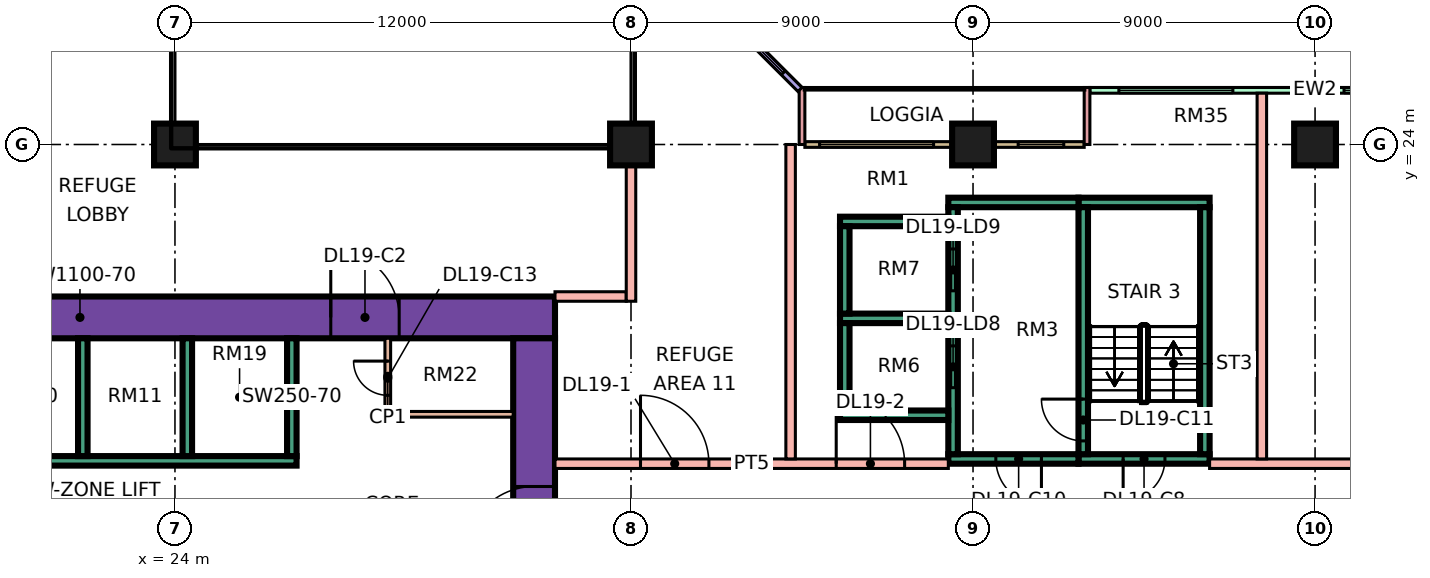
"""IFC4 building model, lengths in metres.
Left out: names, types, materials, properties, quantities, classifications, styles, units other than length and angle.
Written with IfcOpenShell. Run it as: python <this file> out.ifc"""

import sys

from ifc_helpers import new_model, si_unit, direction, frame, frame_2d, origin, origin_2d, place, context, subcontext, project, spatial, rectangle, extrude, element, fill, save


model = new_model("IFC4")
c1 = context("Model", 3, precision=1e-05, world=origin(), true_north=direction((0.0, 1.0)))
c2 = subcontext(c1, "Body", "Model", "MODEL_VIEW")
j1 = project(units=[si_unit("LENGTHUNIT", "METRE"), si_unit("PLANEANGLEUNIT", "RADIAN")], contexts=[c1])
p1 = place(None, origin())
s1 = spatial("IfcSite", under=j1, at=p1, CompositionType="ELEMENT")
p2 = place(p1, origin())
s2 = spatial("IfcBuilding", under=s1, at=p2, CompositionType="ELEMENT")
p3 = place(p2, frame((0.0, 0.0, 86.4)))
s3 = spatial("IfcBuildingStorey", under=s2, at=p3, CompositionType="ELEMENT", Elevation=86.4)
for number, where, z_axis, x_axis in (
    (1, (24.0, 24.0, 0.0), (0.0, 0.0, 1.0), (1.0, 0.0, 0.0)),
    (2, (36.0, 24.0, 0.0), (0.0, 0.0, 1.0), (1.0, 0.0, 0.0)),
    (3, (45.0, 24.0, 0.0), (0.0, 0.0, 1.0), (1.0, 0.0, 0.0)),
    (4, (54.0, 24.0, 0.0), (0.0, 0.0, 1.0), (1.0, 0.0, 0.0)),
):
    element("IfcColumn", number, at=place(p3, frame(where, z_axis=z_axis, x_axis=x_axis)), inside=s3, PredefinedType="COLUMN", context=c2, shape_type="SweptSolid", body=[
        extrude(rectangle(XDim=1.1, YDim=1.1, at=origin_2d()), origin(), (0.0, 0.0, 1.0), 5.5),
    ])
p4 = place(p3, frame((9.0, 19.45, 0.0), z_axis=(0.0, 0.0, 1.0), x_axis=(1.0, 0.0, 0.0)))
e5 = element("IfcWall", 5, at=p4, inside=s3, PredefinedType="SHEAR", context=c2, shape_type="SweptSolid", body=[
    extrude(rectangle(XDim=25.0, YDim=1.1, at=frame_2d((12.5, 0.0))), origin(), (0.0, 0.0, 1.0), 5.5),
])
p5 = place(p4, frame((19.1, 0.0, 0.0)))
e6 = element("IfcOpeningElement", 6, at=p5, cuts=e5, PredefinedType="OPENING", context=c2, shape_type="SweptSolid", body=[
    extrude(rectangle(XDim=1.8, YDim=2.4, at=frame_2d((0.9, 1.2))), frame((0.0, 0.56, 0.0), z_axis=(0.0, -1.0, 0.0), x_axis=(1.0, 0.0, 0.0)), (0.0, 0.0, 1.0), 1.12),
])
p6 = place(p3, frame((33.45, 8.1, 0.0), z_axis=(0.0, 0.0, 1.0), x_axis=(0.0, 1.0, 0.0)))
e7 = element("IfcWall", 7, at=p6, inside=s3, PredefinedType="SHEAR", context=c2, shape_type="SweptSolid", body=[
    extrude(rectangle(XDim=10.8, YDim=1.1, at=frame_2d((5.4, 0.0))), origin(), (0.0, 0.0, 1.0), 5.5),
])
p7 = place(p6, frame((5.1, 0.0, 0.0)))
e8 = element("IfcOpeningElement", 8, at=p7, cuts=e7, PredefinedType="OPENING", context=c2, shape_type="SweptSolid", body=[
    extrude(rectangle(XDim=1.8, YDim=2.4, at=frame_2d((0.9, 1.2))), frame((0.0, 0.56, 0.0), z_axis=(0.0, -1.0, 0.0), x_axis=(1.0, 0.0, 0.0)), (0.0, 0.0, 1.0), 1.12),
])
p8 = place(p3, frame((13.45, 15.675, 0.0), z_axis=(0.0, 0.0, 1.0), x_axis=(1.0, 0.0, 0.0)))
e9 = element("IfcWall", 9, at=p8, inside=s3, PredefinedType="SHEAR", context=c2, shape_type="SweptSolid", body=[
    extrude(rectangle(XDim=13.75, YDim=0.25, at=frame_2d((6.875, 0.0))), origin(), (0.0, 0.0, 1.0), 5.5),
])
for number, where, z_axis, x_axis in (
    (10, (21.575, 15.8, 0.0), (0.0, 0.0, 1.0), (0.0, 1.0, 0.0)),
    (11, (24.325, 15.8, 0.0), (0.0, 0.0, 1.0), (0.0, 1.0, 0.0)),
    (12, (27.075, 15.8, 0.0), (0.0, 0.0, 1.0), (0.0, 1.0, 0.0)),
):
    element("IfcWall", number, at=place(p3, frame(where, z_axis=z_axis, x_axis=x_axis)), inside=s3, PredefinedType="SHEAR", context=c2, shape_type="SweptSolid", body=[
        extrude(rectangle(XDim=3.1, YDim=0.25, at=frame_2d((1.55, 0.0))), origin(), (0.0, 0.0, 1.0), 5.5),
    ])
p9 = place(p3, frame((47.775, 15.725, 0.0), z_axis=(0.0, 0.0, 1.0), x_axis=(1.0, 0.0, 0.0)))
e13 = element("IfcWall", 13, at=p9, inside=s3, PredefinedType="SHEAR", context=c2, shape_type="SweptSolid", body=[
    extrude(rectangle(XDim=3.45, YDim=0.25, at=frame_2d((1.725, 0.0))), origin(), (0.0, 0.0, 1.0), 5.5),
])
p10 = place(p9, frame((1.175, 0.0, 0.0)))
e14 = element("IfcOpeningElement", 14, at=p10, cuts=e13, PredefinedType="OPENING", context=c2, shape_type="SweptSolid", body=[
    extrude(rectangle(XDim=1.1, YDim=2.2, at=frame_2d((0.55, 1.1))), frame((0.0, 0.135, 0.0), z_axis=(0.0, -1.0, 0.0), x_axis=(1.0, 0.0, 0.0)), (0.0, 0.0, 1.0), 0.27),
])
p11 = place(p3, frame((47.775, 22.475, 0.0), z_axis=(0.0, 0.0, 1.0), x_axis=(1.0, 0.0, 0.0)))
e15 = element("IfcWall", 15, at=p11, inside=s3, PredefinedType="SHEAR", context=c2, shape_type="SweptSolid", body=[
    extrude(rectangle(XDim=3.45, YDim=0.25, at=frame_2d((1.725, 0.0))), origin(), (0.0, 0.0, 1.0), 5.5),
])
p12 = place(p3, frame((47.9, 15.85, 0.0), z_axis=(0.0, 0.0, 1.0), x_axis=(0.0, 1.0, 0.0)))
e16 = element("IfcWall", 16, at=p12, inside=s3, PredefinedType="SHEAR", context=c2, shape_type="SweptSolid", body=[
    extrude(rectangle(XDim=6.5, YDim=0.25, at=frame_2d((3.25, 0.0))), origin(), (0.0, 0.0, 1.0), 5.5),
])
p13 = place(p12, frame((0.35, 0.0, 0.0)))
e17 = element("IfcOpeningElement", 17, at=p13, cuts=e16, PredefinedType="OPENING", context=c2, shape_type="SweptSolid", body=[
    extrude(rectangle(XDim=1.1, YDim=2.2, at=frame_2d((0.55, 1.1))), frame((0.0, 0.135, 0.0), z_axis=(0.0, -1.0, 0.0), x_axis=(1.0, 0.0, 0.0)), (0.0, 0.0, 1.0), 0.27),
])
p14 = place(p3, frame((51.1, 15.85, 0.0), z_axis=(0.0, 0.0, 1.0), x_axis=(0.0, 1.0, 0.0)))
e18 = element("IfcWall", 18, at=p14, inside=s3, PredefinedType="SHEAR", context=c2, shape_type="SweptSolid", body=[
    extrude(rectangle(XDim=6.5, YDim=0.25, at=frame_2d((3.25, 0.0))), origin(), (0.0, 0.0, 1.0), 5.5),
])
p15 = place(p3, frame((44.35, 15.725, 0.0), z_axis=(0.0, 0.0, 1.0), x_axis=(1.0, 0.0, 0.0)))
e19 = element("IfcWall", 19, at=p15, inside=s3, PredefinedType="SHEAR", context=c2, shape_type="SweptSolid", body=[
    extrude(rectangle(XDim=3.425, YDim=0.25, at=frame_2d((1.712, 0.0))), origin(), (0.0, 0.0, 1.0), 5.5),
])
p16 = place(p15, frame((1.25, 0.0, 0.0)))
e20 = element("IfcOpeningElement", 20, at=p16, cuts=e19, PredefinedType="OPENING", context=c2, shape_type="SweptSolid", body=[
    extrude(rectangle(XDim=1.2, YDim=2.2, at=frame_2d((0.6, 1.1))), frame((0.0, 0.135, 0.0), z_axis=(0.0, -1.0, 0.0), x_axis=(1.0, 0.0, 0.0)), (0.0, 0.0, 1.0), 0.27),
])
p17 = place(p3, frame((44.35, 22.475, 0.0), z_axis=(0.0, 0.0, 1.0), x_axis=(1.0, 0.0, 0.0)))
e21 = element("IfcWall", 21, at=p17, inside=s3, PredefinedType="SHEAR", context=c2, shape_type="SweptSolid", body=[
    extrude(rectangle(XDim=3.425, YDim=0.25, at=frame_2d((1.712, 0.0))), origin(), (0.0, 0.0, 1.0), 5.5),
])
p18 = place(p3, frame((44.475, 15.85, 0.0), z_axis=(0.0, 0.0, 1.0), x_axis=(0.0, 1.0, 0.0)))
e22 = element("IfcWall", 22, at=p18, inside=s3, PredefinedType="SHEAR", context=c2, shape_type="SweptSolid", body=[
    extrude(rectangle(XDim=6.5, YDim=0.25, at=frame_2d((3.25, 0.0))), origin(), (0.0, 0.0, 1.0), 5.5),
])
p19 = place(p18, frame((1.75, 0.0, 0.0)))
e23 = element("IfcOpeningElement", 23, at=p19, cuts=e22, PredefinedType="OPENING", context=c2, shape_type="SweptSolid", body=[
    extrude(rectangle(XDim=1.1, YDim=2.2, at=frame_2d((0.55, 1.1))), frame((0.0, 0.135, 0.0), z_axis=(0.0, -1.0, 0.0), x_axis=(1.0, 0.0, 0.0)), (0.0, 0.0, 1.0), 0.27),
])
p20 = place(p18, frame((4.3, 0.0, 0.0)))
e24 = element("IfcOpeningElement", 24, at=p20, cuts=e22, PredefinedType="OPENING", context=c2, shape_type="SweptSolid", body=[
    extrude(rectangle(XDim=1.1, YDim=2.2, at=frame_2d((0.55, 1.1))), frame((0.0, 0.135, 0.0), z_axis=(0.0, -1.0, 0.0), x_axis=(1.0, 0.0, 0.0)), (0.0, 0.0, 1.0), 0.27),
])
for number, where, z_axis, x_axis in (
    (25, (41.5, 16.875, 0.0), (0.0, 0.0, 1.0), (1.0, 0.0, 0.0)),
    (26, (41.5, 19.425, 0.0), (0.0, 0.0, 1.0), (1.0, 0.0, 0.0)),
    (27, (41.5, 21.975, 0.0), (0.0, 0.0, 1.0), (1.0, 0.0, 0.0)),
):
    element("IfcWall", number, at=place(p3, frame(where, z_axis=z_axis, x_axis=x_axis)), inside=s3, PredefinedType="SHEAR", context=c2, shape_type="SweptSolid", body=[
        extrude(rectangle(XDim=2.85, YDim=0.25, at=frame_2d((1.425, 0.0))), origin(), (0.0, 0.0, 1.0), 5.5),
    ])
for number, where, z_axis, x_axis in (
    (28, (41.625, 17.0, 0.0), (0.0, 0.0, 1.0), (0.0, 1.0, 0.0)),
    (29, (41.625, 19.55, 0.0), (0.0, 0.0, 1.0), (0.0, 1.0, 0.0)),
):
    element("IfcWall", number, at=place(p3, frame(where, z_axis=z_axis, x_axis=x_axis)), inside=s3, PredefinedType="SHEAR", context=c2, shape_type="SweptSolid", body=[
        extrude(rectangle(XDim=2.3, YDim=0.25, at=frame_2d((1.15, 0.0))), origin(), (0.0, 0.0, 1.0), 5.5),
    ])
p21 = place(p3, frame((59.925, 25.425, 0.0), z_axis=(0.0, 0.0, 1.0), x_axis=(-1.0, 0.0, 0.0)))
e30 = element("IfcWall", 30, at=p21, inside=s3, PredefinedType="SOLIDWALL", context=c2, shape_type="SweptSolid", body=[
    extrude(rectangle(XDim=11.85, YDim=0.15, at=frame_2d((5.925, 0.0))), origin(), (0.0, 0.0, 1.0), 5.1),
])
p22 = place(p21, frame((2.163, 0.0, 0.45)))
e31 = element("IfcOpeningElement", 31, at=p22, cuts=e30, PredefinedType="OPENING", context=c2, shape_type="SweptSolid", body=[
    extrude(rectangle(XDim=3.0, YDim=3.6, at=frame_2d((1.5, 1.8))), frame((0.0, 0.085, 0.0), z_axis=(0.0, -1.0, 0.0), x_axis=(1.0, 0.0, 0.0)), (0.0, 0.0, 1.0), 0.17),
])
p23 = place(p21, frame((8.087, 0.0, 0.45)))
e32 = element("IfcOpeningElement", 32, at=p23, cuts=e30, PredefinedType="OPENING", context=c2, shape_type="SweptSolid", body=[
    extrude(rectangle(XDim=3.0, YDim=3.6, at=frame_2d((1.5, 1.8))), frame((0.0, 0.085, 0.0), z_axis=(0.0, -1.0, 0.0), x_axis=(1.0, 0.0, 0.0)), (0.0, 0.0, 1.0), 0.17),
])
p24 = place(p3, frame((47.925, 24.0, 0.0), z_axis=(0.0, 0.0, 1.0), x_axis=(-1.0, 0.0, 0.0)))
e33 = element("IfcWall", 33, at=p24, inside=s3, PredefinedType="SOLIDWALL", context=c2, shape_type="SweptSolid", body=[
    extrude(rectangle(XDim=7.35, YDim=0.15, at=frame_2d((3.675, 0.0))), origin(), (0.0, 0.0, 1.0), 5.1),
])
p25 = place(p24, frame((0.538, 0.0, 0.45)))
e34 = element("IfcOpeningElement", 34, at=p25, cuts=e33, PredefinedType="OPENING", context=c2, shape_type="SweptSolid", body=[
    extrude(rectangle(XDim=1.2, YDim=3.6, at=frame_2d((0.6, 1.8))), frame((0.0, 0.085, 0.0), z_axis=(0.0, -1.0, 0.0), x_axis=(1.0, 0.0, 0.0)), (0.0, 0.0, 1.0), 0.17),
])
p26 = place(p24, frame((3.962, 0.0, 0.45)))
e35 = element("IfcOpeningElement", 35, at=p26, cuts=e33, PredefinedType="OPENING", context=c2, shape_type="SweptSolid", body=[
    extrude(rectangle(XDim=3.0, YDim=3.6, at=frame_2d((1.5, 1.8))), frame((0.0, 0.085, 0.0), z_axis=(0.0, -1.0, 0.0), x_axis=(1.0, 0.0, 0.0)), (0.0, 0.0, 1.0), 0.17),
])
for number, where, z_axis, x_axis in (
    (36, (48.0, 25.5, 0.0), (0.0, 0.0, 1.0), (0.0, -1.0, 0.0)),
    (37, (40.5, 25.5, 0.0), (0.0, 0.0, 1.0), (0.0, -1.0, 0.0)),
):
    element("IfcWall", number, at=place(p3, frame(where, z_axis=z_axis, x_axis=x_axis)), inside=s3, PredefinedType="SOLIDWALL", context=c2, shape_type="SweptSolid", body=[
        extrude(rectangle(XDim=1.5, YDim=0.15, at=frame_2d((0.75, 0.0))), origin(), (0.0, 0.0, 1.0), 5.1),
    ])
p27 = place(p3, frame((40.447, 25.447, 0.0), z_axis=(0.0, 0.0, 1.0), x_axis=(-0.707106781187, 0.707106781187, 0.0)))
e38 = element("IfcWall", 38, at=p27, inside=s3, PredefinedType="SOLIDWALL", context=c2, shape_type="SweptSolid", body=[
    extrude(rectangle(XDim=4.243, YDim=0.15, at=frame_2d((2.121, 0.0))), origin(), (0.0, 0.0, 1.0), 5.1),
])
p28 = place(p27, frame((0.621, 0.0, 0.45)))
e39 = element("IfcOpeningElement", 39, at=p28, cuts=e38, PredefinedType="OPENING", context=c2, shape_type="SweptSolid", body=[
    extrude(rectangle(XDim=3.0, YDim=3.6, at=frame_2d((1.5, 1.8))), frame((0.0, 0.085, 0.0), z_axis=(0.0, -1.0, 0.0), x_axis=(1.0, 0.0, 0.0)), (0.0, 0.0, 1.0), 0.17),
])
p29 = place(p3, frame((29.6, 16.9, 0.0), z_axis=(0.0, 0.0, 1.0), x_axis=(0.0, 1.0, 0.0)))
e40 = element("IfcWall", 40, at=p29, inside=s3, PredefinedType="PARTITIONING", context=c2, shape_type="SweptSolid", body=[
    extrude(rectangle(XDim=2.0, YDim=0.15, at=frame_2d((1.0, 0.0))), origin(), (0.0, 0.0, 1.0), 5.1),
])
p30 = place(p29, frame((0.5, 0.0, 0.0)))
e41 = element("IfcOpeningElement", 41, at=p30, cuts=e40, PredefinedType="OPENING", context=c2, shape_type="SweptSolid", body=[
    extrude(rectangle(XDim=0.9, YDim=2.1, at=frame_2d((0.45, 1.05))), frame((0.0, 0.085, 0.0), z_axis=(0.0, -1.0, 0.0), x_axis=(1.0, 0.0, 0.0)), (0.0, 0.0, 1.0), 0.17),
])
p31 = place(p3, frame((29.6, 16.9, 0.0), z_axis=(0.0, 0.0, 1.0), x_axis=(1.0, 0.0, 0.0)))
e42 = element("IfcWall", 42, at=p31, inside=s3, PredefinedType="PARTITIONING", context=c2, shape_type="SweptSolid", body=[
    extrude(rectangle(XDim=3.3, YDim=0.15, at=frame_2d((1.65, 0.0))), origin(), (0.0, 0.0, 1.0), 5.1),
])
p32 = place(p3, frame((34.0, 15.6, 0.0), z_axis=(0.0, 0.0, 1.0), x_axis=(1.0, 0.0, 0.0)))
e43 = element("IfcWall", 43, at=p32, inside=s3, PredefinedType="PARTITIONING", context=c2, shape_type="SweptSolid", body=[
    extrude(rectangle(XDim=10.35, YDim=0.25, at=frame_2d((5.175, 0.0))), origin(), (0.0, 0.0, 1.0), 5.1),
])
p33 = place(p32, frame((2.25, 0.0, 0.0)))
e44 = element("IfcOpeningElement", 44, at=p33, cuts=e43, PredefinedType="OPENING", context=c2, shape_type="SweptSolid", body=[
    extrude(rectangle(XDim=1.8, YDim=2.1, at=frame_2d((0.9, 1.05))), frame((0.0, 0.135, 0.0), z_axis=(0.0, -1.0, 0.0), x_axis=(1.0, 0.0, 0.0)), (0.0, 0.0, 1.0), 0.27),
])
p34 = place(p32, frame((7.4, 0.0, 0.0)))
e45 = element("IfcOpeningElement", 45, at=p34, cuts=e43, PredefinedType="OPENING", context=c2, shape_type="SweptSolid", body=[
    extrude(rectangle(XDim=1.8, YDim=2.1, at=frame_2d((0.9, 1.05))), frame((0.0, 0.135, 0.0), z_axis=(0.0, -1.0, 0.0), x_axis=(1.0, 0.0, 0.0)), (0.0, 0.0, 1.0), 0.27),
])
p35 = place(p3, frame((34.0, 20.0, 0.0), z_axis=(0.0, 0.0, 1.0), x_axis=(1.0, 0.0, 0.0)))
e46 = element("IfcWall", 46, at=p35, inside=s3, PredefinedType="PARTITIONING", context=c2, shape_type="SweptSolid", body=[
    extrude(rectangle(XDim=1.875, YDim=0.25, at=frame_2d((0.938, 0.0))), origin(), (0.0, 0.0, 1.0), 5.1),
])
p36 = place(p3, frame((36.0, 19.875, 0.0), z_axis=(0.0, 0.0, 1.0), x_axis=(0.0, 1.0, 0.0)))
e47 = element("IfcWall", 47, at=p36, inside=s3, PredefinedType="PARTITIONING", context=c2, shape_type="SweptSolid", body=[
    extrude(rectangle(XDim=4.125, YDim=0.25, at=frame_2d((2.062, 0.0))), origin(), (0.0, 0.0, 1.0), 5.1),
])
p37 = place(p3, frame((40.2, 15.725, 0.0), z_axis=(0.0, 0.0, 1.0), x_axis=(0.0, 1.0, 0.0)))
e48 = element("IfcWall", 48, at=p37, inside=s3, PredefinedType="PARTITIONING", context=c2, shape_type="SweptSolid", body=[
    extrude(rectangle(XDim=8.275, YDim=0.25, at=frame_2d((4.137, 0.0))), origin(), (0.0, 0.0, 1.0), 5.1),
])
p38 = place(p3, frame((51.225, 15.6, 0.0), z_axis=(0.0, 0.0, 1.0), x_axis=(1.0, 0.0, 0.0)))
e49 = element("IfcWall", 49, at=p38, inside=s3, PredefinedType="PARTITIONING", context=c2, shape_type="SweptSolid", body=[
    extrude(rectangle(XDim=20.701, YDim=0.25, at=frame_2d((10.351, 0.0))), origin(), (0.0, 0.0, 1.0), 5.1),
])
p39 = place(p38, frame((6.075, 0.0, 0.0)))
e50 = element("IfcOpeningElement", 50, at=p39, cuts=e49, PredefinedType="OPENING", context=c2, shape_type="SweptSolid", body=[
    extrude(rectangle(XDim=1.8, YDim=2.1, at=frame_2d((0.9, 1.05))), frame((0.0, 0.135, 0.0), z_axis=(0.0, -1.0, 0.0), x_axis=(1.0, 0.0, 0.0)), (0.0, 0.0, 1.0), 0.27),
])
p40 = place(p38, frame((15.825, 0.0, 0.0)))
e51 = element("IfcOpeningElement", 51, at=p40, cuts=e49, PredefinedType="OPENING", context=c2, shape_type="SweptSolid", body=[
    extrude(rectangle(XDim=1.8, YDim=2.1, at=frame_2d((0.9, 1.05))), frame((0.0, 0.135, 0.0), z_axis=(0.0, -1.0, 0.0), x_axis=(1.0, 0.0, 0.0)), (0.0, 0.0, 1.0), 0.27),
])
p41 = place(p3, frame((52.6, 15.725, 0.0), z_axis=(0.0, 0.0, 1.0), x_axis=(0.0, 1.0, 0.0)))
e52 = element("IfcWall", 52, at=p41, inside=s3, PredefinedType="PARTITIONING", context=c2, shape_type="SweptSolid", body=[
    extrude(rectangle(XDim=9.625, YDim=0.25, at=frame_2d((4.812, 0.0))), origin(), (0.0, 0.0, 1.0), 5.1),
])
p42 = place(p22, origin())
e53 = element("IfcWindow", 53, at=p42, inside=s3, PartitioningType="SINGLE_PANEL", PredefinedType="WINDOW", context=c2, shape_type="SweptSolid", body=[
    extrude(rectangle(XDim=3.0, YDim=3.6, at=frame_2d((1.5, 1.8))), frame((0.0, 0.03, 0.0), z_axis=(0.0, -1.0, 0.0), x_axis=(1.0, 0.0, 0.0)), (0.0, 0.0, 1.0), 0.06),
])
fill(e31, e53)
p43 = place(p23, origin())
e54 = element("IfcWindow", 54, at=p43, inside=s3, PartitioningType="SINGLE_PANEL", PredefinedType="WINDOW", context=c2, shape_type="SweptSolid", body=[
    extrude(rectangle(XDim=3.0, YDim=3.6, at=frame_2d((1.5, 1.8))), frame((0.0, 0.03, 0.0), z_axis=(0.0, -1.0, 0.0), x_axis=(1.0, 0.0, 0.0)), (0.0, 0.0, 1.0), 0.06),
])
fill(e32, e54)
p44 = place(p25, origin())
e55 = element("IfcWindow", 55, at=p44, inside=s3, PartitioningType="SINGLE_PANEL", PredefinedType="WINDOW", context=c2, shape_type="SweptSolid", body=[
    extrude(rectangle(XDim=1.2, YDim=3.6, at=frame_2d((0.6, 1.8))), frame((0.0, 0.03, 0.0), z_axis=(0.0, -1.0, 0.0), x_axis=(1.0, 0.0, 0.0)), (0.0, 0.0, 1.0), 0.06),
])
fill(e34, e55)
p45 = place(p26, origin())
e56 = element("IfcWindow", 56, at=p45, inside=s3, PartitioningType="SINGLE_PANEL", PredefinedType="WINDOW", context=c2, shape_type="SweptSolid", body=[
    extrude(rectangle(XDim=3.0, YDim=3.6, at=frame_2d((1.5, 1.8))), frame((0.0, 0.03, 0.0), z_axis=(0.0, -1.0, 0.0), x_axis=(1.0, 0.0, 0.0)), (0.0, 0.0, 1.0), 0.06),
])
fill(e35, e56)
p46 = place(p28, origin())
e57 = element("IfcWindow", 57, at=p46, inside=s3, PartitioningType="SINGLE_PANEL", PredefinedType="WINDOW", context=c2, shape_type="SweptSolid", body=[
    extrude(rectangle(XDim=3.0, YDim=3.6, at=frame_2d((1.5, 1.8))), frame((0.0, 0.03, 0.0), z_axis=(0.0, -1.0, 0.0), x_axis=(1.0, 0.0, 0.0)), (0.0, 0.0, 1.0), 0.06),
])
fill(e39, e57)
p47 = place(p7, origin())
e58 = element("IfcDoor", 58, at=p47, inside=s3, OperationType="DOUBLE_DOOR_SINGLE_SWING", PredefinedType="DOOR", context=c2, shape_type="SweptSolid", body=[
    extrude(rectangle(XDim=1.8, YDim=2.4, at=frame_2d((0.9, 1.2))), frame((0.0, 0.025, 0.0), z_axis=(0.0, -1.0, 0.0), x_axis=(1.0, 0.0, 0.0)), (0.0, 0.0, 1.0), 0.05),
])
fill(e8, e58)
p48 = place(p5, origin())
e59 = element("IfcDoor", 59, at=p48, inside=s3, OperationType="DOUBLE_DOOR_SINGLE_SWING", PredefinedType="DOOR", context=c2, shape_type="SweptSolid", body=[
    extrude(rectangle(XDim=1.8, YDim=2.4, at=frame_2d((0.9, 1.2))), frame((0.0, 0.025, 0.0), z_axis=(0.0, -1.0, 0.0), x_axis=(1.0, 0.0, 0.0)), (0.0, 0.0, 1.0), 0.05),
])
fill(e6, e59)
p49 = place(p10, frame((1.1, 0.0, 0.0), z_axis=(0.0, 0.0, 1.0), x_axis=(-1.0, 0.0, 0.0)))
e60 = element("IfcDoor", 60, at=p49, inside=s3, OperationType="SINGLE_SWING_LEFT", PredefinedType="DOOR", context=c2, shape_type="SweptSolid", body=[
    extrude(rectangle(XDim=1.1, YDim=2.2, at=frame_2d((0.55, 1.1))), frame((0.0, 0.025, 0.0), z_axis=(0.0, -1.0, 0.0), x_axis=(1.0, 0.0, 0.0)), (0.0, 0.0, 1.0), 0.05),
])
fill(e14, e60)
p50 = place(p16, origin())
e61 = element("IfcDoor", 61, at=p50, inside=s3, OperationType="SINGLE_SWING_RIGHT", PredefinedType="DOOR", context=c2, shape_type="SweptSolid", body=[
    extrude(rectangle(XDim=1.2, YDim=2.2, at=frame_2d((0.6, 1.1))), frame((0.0, 0.025, 0.0), z_axis=(0.0, -1.0, 0.0), x_axis=(1.0, 0.0, 0.0)), (0.0, 0.0, 1.0), 0.05),
])
fill(e20, e61)
p51 = place(p13, frame((1.1, 0.0, 0.0), z_axis=(0.0, 0.0, 1.0), x_axis=(-1.0, 0.0, 0.0)))
e62 = element("IfcDoor", 62, at=p51, inside=s3, OperationType="SINGLE_SWING_RIGHT", PredefinedType="DOOR", context=c2, shape_type="SweptSolid", body=[
    extrude(rectangle(XDim=1.1, YDim=2.2, at=frame_2d((0.55, 1.1))), frame((0.0, 0.025, 0.0), z_axis=(0.0, -1.0, 0.0), x_axis=(1.0, 0.0, 0.0)), (0.0, 0.0, 1.0), 0.05),
])
fill(e17, e62)
p52 = place(p19, origin())
e63 = element("IfcDoor", 63, at=p52, inside=s3, OperationType="DOUBLE_DOOR_SLIDING", PredefinedType="DOOR", context=c2, shape_type="SweptSolid", body=[
    extrude(rectangle(XDim=1.1, YDim=2.2, at=frame_2d((0.55, 1.1))), frame((0.0, 0.025, 0.0), z_axis=(0.0, -1.0, 0.0), x_axis=(1.0, 0.0, 0.0)), (0.0, 0.0, 1.0), 0.05),
])
fill(e23, e63)
p53 = place(p20, origin())
e64 = element("IfcDoor", 64, at=p53, inside=s3, OperationType="DOUBLE_DOOR_SLIDING", PredefinedType="DOOR", context=c2, shape_type="SweptSolid", body=[
    extrude(rectangle(XDim=1.1, YDim=2.2, at=frame_2d((0.55, 1.1))), frame((0.0, 0.025, 0.0), z_axis=(0.0, -1.0, 0.0), x_axis=(1.0, 0.0, 0.0)), (0.0, 0.0, 1.0), 0.05),
])
fill(e24, e64)
p54 = place(p30, frame((0.9, 0.0, 0.0), z_axis=(0.0, 0.0, 1.0), x_axis=(-1.0, 0.0, 0.0)))
e65 = element("IfcDoor", 65, at=p54, inside=s3, OperationType="SINGLE_SWING_RIGHT", PredefinedType="DOOR", context=c2, shape_type="SweptSolid", body=[
    extrude(rectangle(XDim=0.9, YDim=2.1, at=frame_2d((0.45, 1.05))), frame((0.0, 0.025, 0.0), z_axis=(0.0, -1.0, 0.0), x_axis=(1.0, 0.0, 0.0)), (0.0, 0.0, 1.0), 0.05),
])
fill(e41, e65)
p55 = place(p33, origin())
e66 = element("IfcDoor", 66, at=p55, inside=s3, OperationType="DOUBLE_DOOR_SINGLE_SWING", PredefinedType="DOOR", context=c2, shape_type="SweptSolid", body=[
    extrude(rectangle(XDim=1.8, YDim=2.1, at=frame_2d((0.9, 1.05))), frame((0.0, 0.025, 0.0), z_axis=(0.0, -1.0, 0.0), x_axis=(1.0, 0.0, 0.0)), (0.0, 0.0, 1.0), 0.05),
])
fill(e44, e66)
p56 = place(p34, origin())
e67 = element("IfcDoor", 67, at=p56, inside=s3, OperationType="DOUBLE_DOOR_SINGLE_SWING", PredefinedType="DOOR", context=c2, shape_type="SweptSolid", body=[
    extrude(rectangle(XDim=1.8, YDim=2.1, at=frame_2d((0.9, 1.05))), frame((0.0, 0.025, 0.0), z_axis=(0.0, -1.0, 0.0), x_axis=(1.0, 0.0, 0.0)), (0.0, 0.0, 1.0), 0.05),
])
fill(e45, e67)
save(model, sys.argv[1])
